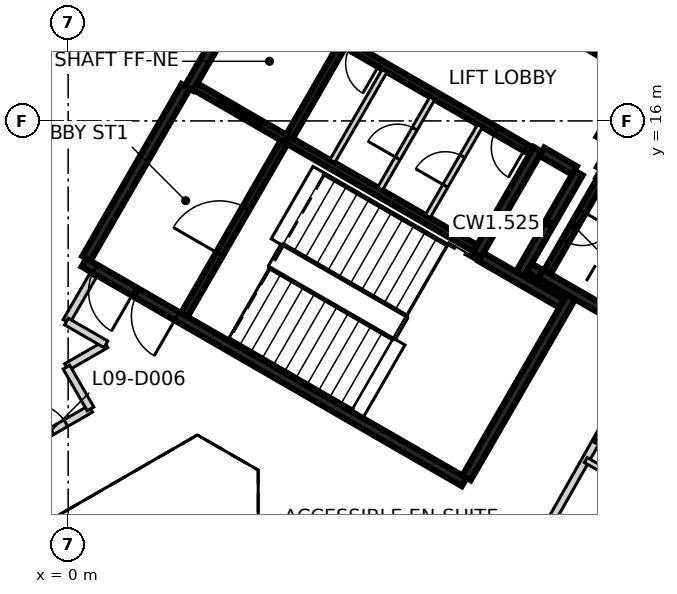
"""IFC4 building model, lengths in metres.
Left out: names, types, materials, properties, quantities, classifications, styles, units other than length and angle.
Written with IfcOpenShell. Run it as: python <this file> out.ifc"""

import sys

from ifc_helpers import new_model, si_unit, direction, frame, frame_2d, origin, place, context, subcontext, project, spatial, rectangle, extrude, element, fill, save


model = new_model("IFC4")
c1 = context("Model", 3, precision=1e-05, world=origin(), true_north=direction((0.0, 1.0)))
c2 = subcontext(c1, "Body", "Model", "MODEL_VIEW")
j1 = project(units=[si_unit("LENGTHUNIT", "METRE"), si_unit("PLANEANGLEUNIT", "RADIAN")], contexts=[c1])
p1 = place(None, origin())
s1 = spatial("IfcSite", under=j1, at=p1, CompositionType="ELEMENT")
p2 = place(p1, origin())
s2 = spatial("IfcBuilding", under=s1, at=p2, CompositionType="ELEMENT")
p3 = place(p2, frame((0.0, 0.0, 45.8)))
s3 = spatial("IfcBuildingStorey", under=s2, at=p3, CompositionType="ELEMENT", Elevation=45.8)
p4 = place(p3, frame((10.42, 6.498, 0.0), z_axis=(0.0, 0.0, 1.0), x_axis=(-0.866021906294, 0.500006057782, 0.0)))
e1 = element("IfcWall", 1, at=p4, inside=s3, PredefinedType="SHEAR", context=c2, shape_type="SweptSolid", body=[
    extrude(rectangle(XDim=11.55, YDim=0.25, at=frame_2d((5.775, 0.0))), origin(), (0.0, 0.0, 1.0), 3.125),
])
p5 = place(p4, frame((10.025, 0.0, 0.0)))
e2 = element("IfcOpeningElement", 2, at=p5, cuts=e1, PredefinedType="OPENING", context=c2, shape_type="SweptSolid", body=[
    extrude(rectangle(XDim=1.2, YDim=2.1, at=frame_2d((0.6, 1.05))), frame((0.0, 0.135, 0.0), z_axis=(0.0, -1.0, 0.0), x_axis=(1.0, 0.0, 0.0)), (0.0, 0.0, 1.0), 0.27),
])
p6 = place(p4, frame((8.725, 0.0, 0.0)))
e3 = element("IfcOpeningElement", 3, at=p6, cuts=e1, PredefinedType="OPENING", context=c2, shape_type="SweptSolid", body=[
    extrude(rectangle(XDim=1.2, YDim=2.1, at=frame_2d((0.6, 1.05))), frame((0.0, 0.135, 0.0), z_axis=(0.0, -1.0, 0.0), x_axis=(1.0, 0.0, 0.0)), (0.0, 0.0, 1.0), 0.27),
])
p7 = place(p3, frame((3.179, 16.856, 0.0), z_axis=(0.0, 0.0, 1.0), x_axis=(0.500004234368, 0.866022959057, 0.0)))
e4 = element("IfcWall", 4, at=p7, inside=s3, PredefinedType="SHEAR", context=c2, shape_type="SweptSolid", body=[
    extrude(rectangle(XDim=6.25, YDim=0.25, at=frame_2d((3.125, 0.0))), origin(), (0.0, 0.0, 1.0), 3.125),
])
p8 = place(p3, frame((0.48, 12.381, 0.0), z_axis=(0.0, 0.0, 1.0), x_axis=(0.49999885962, 0.866026062182, 0.0)))
e5 = element("IfcWall", 5, at=p8, inside=s3, PredefinedType="SHEAR", context=c2, shape_type="SweptSolid", body=[
    extrude(rectangle(XDim=5.225, YDim=0.25, at=frame_2d((2.612, 0.0))), origin(), (0.0, 0.0, 1.0), 3.125),
])
p9 = place(p3, frame((13.238, 11.378, 0.0), z_axis=(0.0, 0.0, 1.0), x_axis=(-0.500008851346, -0.866020293397, 0.0)))
e6 = element("IfcWall", 6, at=p9, inside=s3, PredefinedType="SHEAR", context=c2, shape_type="SweptSolid", body=[
    extrude(rectangle(XDim=5.51, YDim=0.25, at=frame_2d((2.755, 0.0))), origin(), (0.0, 0.0, 1.0), 3.125),
])
p10 = place(p3, frame((12.357, 15.252, 0.0), z_axis=(0.0, 0.0, 1.0), x_axis=(-0.500028443584, -0.866008981251, 0.0)))
e7 = element("IfcWall", 7, at=p10, inside=s3, PredefinedType="SHEAR", context=c2, shape_type="SweptSolid", body=[
    extrude(rectangle(XDim=3.2, YDim=0.25, at=frame_2d((1.6, 0.0))), origin(), (0.0, 0.0, 1.0), 3.125),
])
p11 = place(p3, frame((14.918, 10.54, 0.0), z_axis=(0.0, 0.0, 1.0), x_axis=(-0.866063538972, 0.499933942099, 0.0)))
e8 = element("IfcWall", 8, at=p11, inside=s3, PredefinedType="SHEAR", context=c2, shape_type="SweptSolid", body=[
    extrude(rectangle(XDim=2.865, YDim=0.25, at=frame_2d((1.432, 0.0))), origin(), (0.0, 0.0, 1.0), 3.125),
])
p12 = place(p3, frame((13.963, 14.614, 0.0), z_axis=(0.0, 0.0, 1.0), x_axis=(0.866042235819, -0.499970844928, 0.0)))
e9 = element("IfcWall", 9, at=p12, inside=s3, PredefinedType="SHEAR", context=c2, shape_type="SweptSolid", body=[
    extrude(rectangle(XDim=2.865, YDim=0.25, at=frame_2d((1.432, 0.0))), origin(), (0.0, 0.0, 1.0), 3.125),
])
p13 = place(p3, frame((11.888, 11.961, 0.0), z_axis=(0.0, 0.0, 1.0), x_axis=(0.500003324108, 0.866023484601, 0.0)))
e10 = element("IfcWall", 10, at=p13, inside=s3, PredefinedType="SHEAR", context=c2, shape_type="SweptSolid", body=[
    extrude(rectangle(XDim=3.085, YDim=0.25, at=frame_2d((1.542, 0.0))), origin(), (0.0, 0.0, 1.0), 3.125),
])
p14 = place(p3, frame((10.865, 12.418, 0.0), z_axis=(0.0, 0.0, 1.0), x_axis=(0.866026229868, -0.499998569178, 0.0)))
e11 = element("IfcWall", 11, at=p14, inside=s3, PredefinedType="SHEAR", context=c2, shape_type="SweptSolid", body=[
    extrude(rectangle(XDim=2.449, YDim=0.25, at=frame_2d((1.225, 0.0))), origin(), (0.0, 0.0, 1.0), 3.125),
])
p15 = place(p3, frame((13.297, 18.231, 0.0), z_axis=(0.0, 0.0, 1.0), x_axis=(0.866043531843, -0.499968599967, 0.0)))
e12 = element("IfcWall", 12, at=p15, inside=s3, PredefinedType="SHEAR", context=c2, shape_type="SweptSolid", body=[
    extrude(rectangle(XDim=1.975, YDim=0.25, at=frame_2d((0.987, 0.0))), origin(), (0.0, 0.0, 1.0), 3.125),
])
p16 = place(p3, frame((14.945, 17.135, 0.0), z_axis=(0.0, 0.0, 1.0), x_axis=(-0.499983108224, -0.866035156036, 0.0)))
e13 = element("IfcWall", 13, at=p16, inside=s3, PredefinedType="SHEAR", context=c2, shape_type="SweptSolid", body=[
    extrude(rectangle(XDim=1.865, YDim=0.25, at=frame_2d((0.932, 0.0))), origin(), (0.0, 0.0, 1.0), 3.125),
])
p17 = place(p16, frame((0.535, 0.0, 0.0)))
e14 = element("IfcOpeningElement", 14, at=p17, cuts=e13, PredefinedType="OPENING", context=c2, shape_type="SweptSolid", body=[
    extrude(rectangle(XDim=1.25, YDim=2.1, at=frame_2d((0.625, 1.05))), frame((0.0, 0.135, 0.0), z_axis=(0.0, -1.0, 0.0), x_axis=(1.0, 0.0, 0.0)), (0.0, 0.0, 1.0), 0.27),
])
p18 = place(p3, frame((13.322, 14.695, 0.0), z_axis=(0.0, 0.0, 1.0), x_axis=(-0.866017078145, 0.500014420154, 0.0)))
e15 = element("IfcWall", 15, at=p18, inside=s3, PredefinedType="SHEAR", context=c2, shape_type="SweptSolid", body=[
    extrude(rectangle(XDim=0.989, YDim=0.25, at=frame_2d((0.495, 0.0))), origin(), (0.0, 0.0, 1.0), 3.125),
])
p19 = place(p3, frame((14.368, 15.315, 0.0), z_axis=(0.0, 0.0, 1.0), x_axis=(-0.499897359611, -0.866084655132, 0.0)))
e16 = element("IfcWall", 16, at=p19, inside=s3, PredefinedType="SHEAR", context=c2, shape_type="SweptSolid", body=[
    extrude(rectangle(XDim=0.685, YDim=0.25, at=frame_2d((0.342, 0.0))), origin(), (0.0, 0.0, 1.0), 3.125),
])
p20 = place(p3, frame((12.433, 11.964, 0.0), z_axis=(0.0, 0.0, 1.0), x_axis=(-0.866055875208, 0.499947218231, 0.0)))
e17 = element("IfcWall", 17, at=p20, inside=s3, PredefinedType="SHEAR", context=c2, shape_type="SweptSolid", body=[
    extrude(rectangle(XDim=0.345, YDim=0.25, at=frame_2d((0.172, 0.0))), origin(), (0.0, 0.0, 1.0), 3.125),
])
p21 = place(p3, frame((5.775, 15.502, 0.0), z_axis=(0.0, 0.0, 1.0), x_axis=(0.866020080793, -0.500009219579, 0.0)))
e18 = element("IfcWall", 18, at=p21, inside=s3, PredefinedType="SHEAR", context=c2, shape_type="SweptSolid", body=[
    extrude(rectangle(XDim=5.699, YDim=0.2, at=frame_2d((2.85, 0.0))), origin(), (0.0, 0.0, 1.0), 3.125),
])
p22 = place(p3, frame((12.185, 15.207, 0.0), z_axis=(0.0, 0.0, 1.0), x_axis=(-0.866020080793, 0.500009219579, 0.0)))
e19 = element("IfcWall", 19, at=p22, inside=s3, PredefinedType="SHEAR", context=c2, shape_type="SweptSolid", body=[
    extrude(rectangle(XDim=5.699, YDim=0.2, at=frame_2d((2.85, 0.0))), origin(), (0.0, 0.0, 1.0), 3.125),
])
p23 = place(p22, frame((0.174, 0.0, 0.0)))
e20 = element("IfcOpeningElement", 20, at=p23, cuts=e19, PredefinedType="OPENING", context=c2, shape_type="SweptSolid", body=[
    extrude(rectangle(XDim=0.9, YDim=2.1, at=frame_2d((0.45, 1.05))), frame((0.0, 0.11, 0.0), z_axis=(0.0, -1.0, 0.0), x_axis=(1.0, 0.0, 0.0)), (0.0, 0.0, 1.0), 0.22),
])
p24 = place(p22, frame((4.599, 0.0, 0.0)))
e21 = element("IfcOpeningElement", 21, at=p24, cuts=e19, PredefinedType="OPENING", context=c2, shape_type="SweptSolid", body=[
    extrude(rectangle(XDim=0.9, YDim=2.1, at=frame_2d((0.45, 1.05))), frame((0.0, 0.11, 0.0), z_axis=(0.0, -1.0, 0.0), x_axis=(1.0, 0.0, 0.0)), (0.0, 0.0, 1.0), 0.22),
])
p25 = place(p3, frame((3.057, 10.895, 0.0), z_axis=(0.0, 0.0, 1.0), x_axis=(0.499989418164, 0.866031513124, 0.0)))
e22 = element("IfcWall", 22, at=p25, inside=s3, PredefinedType="SHEAR", context=c2, shape_type="SweptSolid", body=[
    extrude(rectangle(XDim=5.251, YDim=0.2, at=frame_2d((2.625, 0.0))), origin(), (0.0, 0.0, 1.0), 3.125),
])
p26 = place(p25, frame((1.849, 0.0, 0.0)))
e23 = element("IfcOpeningElement", 23, at=p26, cuts=e22, PredefinedType="OPENING", context=c2, shape_type="SweptSolid", body=[
    extrude(rectangle(XDim=1.4, YDim=2.1, at=frame_2d((0.7, 1.05))), frame((0.0, 0.11, 0.0), z_axis=(0.0, -1.0, 0.0), x_axis=(1.0, 0.0, 0.0)), (0.0, 0.0, 1.0), 0.22),
])
p27 = place(p3, frame((14.008, 14.442, 0.0), z_axis=(0.0, 0.0, 1.0), x_axis=(-0.499986818241, -0.866033014143, 0.0)))
e24 = element("IfcWall", 24, at=p27, inside=s3, PredefinedType="SHEAR", context=c2, shape_type="SweptSolid", body=[
    extrude(rectangle(XDim=2.798, YDim=0.2, at=frame_2d((1.399, 0.0))), origin(), (0.0, 0.0, 1.0), 3.125),
])
p28 = place(p27, frame((0.949, 0.0, 0.0)))
e25 = element("IfcOpeningElement", 25, at=p28, cuts=e24, PredefinedType="OPENING", context=c2, shape_type="SweptSolid", body=[
    extrude(rectangle(XDim=0.9, YDim=2.1, at=frame_2d((0.45, 1.05))), frame((0.0, 0.11, 0.0), z_axis=(0.0, -1.0, 0.0), x_axis=(1.0, 0.0, 0.0)), (0.0, 0.0, 1.0), 0.22),
])
p29 = place(p3, frame((7.199, 17.97, 0.0), z_axis=(0.0, 0.0, 1.0), x_axis=(-0.499968400327, -0.866043647095, 0.0)))
e26 = element("IfcWall", 26, at=p29, inside=s3, PredefinedType="SHEAR", context=c2, shape_type="SweptSolid", body=[
    extrude(rectangle(XDim=2.75, YDim=0.2, at=frame_2d((1.375, 0.0))), origin(), (0.0, 0.0, 1.0), 3.125),
])
p30 = place(p3, frame((5.725, 15.531, 0.0), z_axis=(0.0, 0.0, 1.0), x_axis=(-0.866037306777, 0.499979382845, 0.0)))
e27 = element("IfcWall", 27, at=p30, inside=s3, PredefinedType="SHEAR", context=c2, shape_type="SweptSolid", body=[
    extrude(rectangle(XDim=2.742, YDim=0.2, at=frame_2d((1.371, 0.0))), origin(), (0.0, 0.0, 1.0), 3.125),
])
p31 = place(p30, frame((0.743, 0.0, 0.0)))
e28 = element("IfcOpeningElement", 28, at=p31, cuts=e27, PredefinedType="OPENING", context=c2, shape_type="SweptSolid", body=[
    extrude(rectangle(XDim=1.3, YDim=2.1, at=frame_2d((0.65, 1.05))), frame((0.0, 0.11, 0.0), z_axis=(0.0, -1.0, 0.0), x_axis=(1.0, 0.0, 0.0)), (0.0, 0.0, 1.0), 0.22),
])
p32 = place(p3, frame((9.462, 13.489, 0.0), z_axis=(0.0, 0.0, 1.0), x_axis=(0.50002746344, 0.86600954718, 0.0)))
e29 = element("IfcWall", 29, at=p32, inside=s3, PredefinedType="PARTITIONING", context=c2, shape_type="SweptSolid", body=[
    extrude(rectangle(XDim=2.748, YDim=0.15, at=frame_2d((1.374, 0.0))), origin(), (0.0, 0.0, 1.0), 3.125),
])
p33 = place(p32, frame((0.924, 0.0, 0.0)))
e30 = element("IfcOpeningElement", 30, at=p33, cuts=e29, PredefinedType="OPENING", context=c2, shape_type="SweptSolid", body=[
    extrude(rectangle(XDim=0.9, YDim=2.1, at=frame_2d((0.45, 1.05))), frame((0.0, 0.085, 0.0), z_axis=(0.0, -1.0, 0.0), x_axis=(1.0, 0.0, 0.0)), (0.0, 0.0, 1.0), 0.17),
])
p34 = place(p3, frame((8.207, 14.214, 0.0), z_axis=(0.0, 0.0, 1.0), x_axis=(0.499922376475, 0.866070215109, 0.0)))
e31 = element("IfcWall", 31, at=p34, inside=s3, PredefinedType="PARTITIONING", context=c2, shape_type="SweptSolid", body=[
    extrude(rectangle(XDim=2.749, YDim=0.15, at=frame_2d((1.374, 0.0))), origin(), (0.0, 0.0, 1.0), 3.125),
])
p35 = place(p34, frame((0.924, 0.0, 0.0)))
e32 = element("IfcOpeningElement", 32, at=p35, cuts=e31, PredefinedType="OPENING", context=c2, shape_type="SweptSolid", body=[
    extrude(rectangle(XDim=0.9, YDim=2.1, at=frame_2d((0.45, 1.05))), frame((0.0, 0.085, 0.0), z_axis=(0.0, -1.0, 0.0), x_axis=(1.0, 0.0, 0.0)), (0.0, 0.0, 1.0), 0.17),
])
p36 = place(p3, frame((6.951, 14.939, 0.0), z_axis=(0.0, 0.0, 1.0), x_axis=(0.50002746344, 0.86600954718, 0.0)))
e33 = element("IfcWall", 33, at=p36, inside=s3, PredefinedType="PARTITIONING", context=c2, shape_type="SweptSolid", body=[
    extrude(rectangle(XDim=2.748, YDim=0.15, at=frame_2d((1.374, 0.0))), origin(), (0.0, 0.0, 1.0), 3.125),
])
p37 = place(p3, frame((-5.446, 4.94, 0.0), z_axis=(0.0, 0.0, 1.0), x_axis=(0.866096332545, 0.499877127655, 0.0)))
e34 = element("IfcWall", 34, at=p37, inside=s3, PredefinedType="PARTITIONING", context=c2, shape_type="SweptSolid", body=[
    extrude(rectangle(XDim=6.969, YDim=0.2, at=frame_2d((3.484, 0.0))), origin(), (0.0, 0.0, 1.0), 3.125),
])
p38 = place(p37, frame((5.219, 0.0, 0.0)))
e35 = element("IfcOpeningElement", 35, at=p38, cuts=e34, PredefinedType="OPENING", context=c2, shape_type="SweptSolid", body=[
    extrude(rectangle(XDim=1.0, YDim=2.1, at=frame_2d((0.5, 1.05))), frame((0.0, 0.11, 0.0), z_axis=(0.0, -1.0, 0.0), x_axis=(1.0, 0.0, 0.0)), (0.0, 0.0, 1.0), 0.22),
])
p39 = place(p37, frame((3.344, 0.0, 0.0)))
e36 = element("IfcOpeningElement", 36, at=p39, cuts=e34, PredefinedType="OPENING", context=c2, shape_type="SweptSolid", body=[
    extrude(rectangle(XDim=0.95, YDim=2.1, at=frame_2d((0.475, 1.05))), frame((0.0, 0.11, 0.0), z_axis=(0.0, -1.0, 0.0), x_axis=(1.0, 0.0, 0.0)), (0.0, 0.0, 1.0), 0.22),
])
p40 = place(p3, frame((-0.045, 9.522, 0.0), z_axis=(0.0, 0.0, 1.0), x_axis=(0.86625675314, 0.499599076899, 0.0)))
e37 = element("IfcWall", 37, at=p40, inside=s3, PredefinedType="PARTITIONING", context=c2, shape_type="SweptSolid", body=[
    extrude(rectangle(XDim=1.199, YDim=0.2, at=frame_2d((0.6, 0.0))), origin(), (0.0, 0.0, 1.0), 3.125),
])
p41 = place(p3, frame((-0.045, 10.722, 0.0), z_axis=(0.0, 0.0, 1.0), x_axis=(0.500107785535, 0.865963164833, 0.0)))
e38 = element("IfcWall", 38, at=p41, inside=s3, PredefinedType="PARTITIONING", context=c2, shape_type="SweptSolid", body=[
    extrude(rectangle(XDim=1.389, YDim=0.2, at=frame_2d((0.695, 0.0))), origin(), (0.0, 0.0, 1.0), 3.125),
])
p42 = place(p3, frame((-0.045, 9.521, 0.0), z_axis=(0.0, 0.0, 1.0), x_axis=(0.500094716449, -0.865970712311, 0.0)))
e39 = element("IfcWall", 39, at=p42, inside=s3, PredefinedType="PARTITIONING", context=c2, shape_type="SweptSolid", body=[
    extrude(rectangle(XDim=1.268, YDim=0.2, at=frame_2d((0.634, 0.0))), origin(), (0.0, 0.0, 1.0), 3.125),
])
p43 = place(p3, frame((-0.045, 10.721, 0.0), z_axis=(0.0, 0.0, 1.0), x_axis=(0.865992388649, -0.500057179532, 0.0)))
e40 = element("IfcWall", 40, at=p43, inside=s3, PredefinedType="PARTITIONING", context=c2, shape_type="SweptSolid", body=[
    extrude(rectangle(XDim=1.199, YDim=0.2, at=frame_2d((0.6, 0.0))), origin(), (0.0, 0.0, 1.0), 3.125),
])
p44 = place(p3, frame((12.432, 4.992, 0.0), z_axis=(0.0, 0.0, 1.0), x_axis=(0.492790102015, 0.870148214591, 0.0)))
e41 = element("IfcWall", 41, at=p44, inside=s3, PredefinedType="PARTITIONING", context=c2, shape_type="SweptSolid", body=[
    extrude(rectangle(XDim=5.981, YDim=0.2, at=frame_2d((2.991, 0.0))), origin(), (0.0, 0.0, 1.0), 3.125),
])
p45 = place(p3, frame((13.619, 7.076, 0.0), z_axis=(0.0, 0.0, 1.0), x_axis=(0.870725399165, -0.491769538758, 0.0)))
e42 = element("IfcWall", 42, at=p45, inside=s3, PredefinedType="PARTITIONING", context=c2, shape_type="SweptSolid", body=[
    extrude(rectangle(XDim=2.489, YDim=0.15, at=frame_2d((1.244, 0.0))), origin(), (0.0, 0.0, 1.0), 3.125),
])
p46 = place(p45, frame((0.845, 0.0, 0.0)))
e43 = element("IfcOpeningElement", 43, at=p46, cuts=e42, PredefinedType="OPENING", context=c2, shape_type="SweptSolid", body=[
    extrude(rectangle(XDim=0.8, YDim=2.1, at=frame_2d((0.4, 1.05))), frame((0.0, 0.085, 0.0), z_axis=(0.0, -1.0, 0.0), x_axis=(1.0, 0.0, 0.0)), (0.0, 0.0, 1.0), 0.17),
])
p47 = place(p31, origin())
e44 = element("IfcDoor", 44, at=p47, inside=s3, OperationType="SLIDING_TO_RIGHT", PredefinedType="DOOR", context=c2, shape_type="SweptSolid", body=[
    extrude(rectangle(XDim=1.3, YDim=2.1, at=frame_2d((0.65, 1.05))), frame((0.0, 0.025, 0.0), z_axis=(0.0, -1.0, 0.0), x_axis=(1.0, 0.0, 0.0)), (0.0, 0.0, 1.0), 0.05),
])
fill(e28, e44)
p48 = place(p5, origin())
e45 = element("IfcDoor", 45, at=p48, inside=s3, OperationType="SINGLE_SWING_LEFT", PredefinedType="DOOR", context=c2, shape_type="SweptSolid", body=[
    extrude(rectangle(XDim=1.2, YDim=2.1, at=frame_2d((0.6, 1.05))), frame((0.0, 0.025, 0.0), z_axis=(0.0, -1.0, 0.0), x_axis=(1.0, 0.0, 0.0)), (0.0, 0.0, 1.0), 0.05),
])
fill(e2, e45)
p49 = place(p6, origin())
e46 = element("IfcDoor", 46, at=p49, inside=s3, OperationType="SINGLE_SWING_RIGHT", PredefinedType="DOOR", context=c2, shape_type="SweptSolid", body=[
    extrude(rectangle(XDim=1.2, YDim=2.1, at=frame_2d((0.6, 1.05))), frame((0.0, 0.025, 0.0), z_axis=(0.0, -1.0, 0.0), x_axis=(1.0, 0.0, 0.0)), (0.0, 0.0, 1.0), 0.05),
])
fill(e3, e46)
p50 = place(p26, origin())
e47 = element("IfcDoor", 47, at=p50, inside=s3, OperationType="SINGLE_SWING_RIGHT", PredefinedType="DOOR", context=c2, shape_type="SweptSolid", body=[
    extrude(rectangle(XDim=1.4, YDim=2.1, at=frame_2d((0.7, 1.05))), frame((0.0, 0.025, 0.0), z_axis=(0.0, -1.0, 0.0), x_axis=(1.0, 0.0, 0.0)), (0.0, 0.0, 1.0), 0.05),
])
fill(e23, e47)
p51 = place(p23, origin())
e48 = element("IfcDoor", 48, at=p51, inside=s3, OperationType="SINGLE_SWING_LEFT", PredefinedType="DOOR", context=c2, shape_type="SweptSolid", body=[
    extrude(rectangle(XDim=0.9, YDim=2.1, at=frame_2d((0.45, 1.05))), frame((0.0, 0.025, 0.0), z_axis=(0.0, -1.0, 0.0), x_axis=(1.0, 0.0, 0.0)), (0.0, 0.0, 1.0), 0.05),
])
fill(e20, e48)
p52 = place(p33, origin())
e49 = element("IfcDoor", 49, at=p52, inside=s3, OperationType="SINGLE_SWING_RIGHT", PredefinedType="DOOR", context=c2, shape_type="SweptSolid", body=[
    extrude(rectangle(XDim=0.9, YDim=2.1, at=frame_2d((0.45, 1.05))), frame((0.0, 0.025, 0.0), z_axis=(0.0, -1.0, 0.0), x_axis=(1.0, 0.0, 0.0)), (0.0, 0.0, 1.0), 0.05),
])
fill(e30, e49)
p53 = place(p35, origin())
e50 = element("IfcDoor", 50, at=p53, inside=s3, OperationType="SINGLE_SWING_LEFT", PredefinedType="DOOR", context=c2, shape_type="SweptSolid", body=[
    extrude(rectangle(XDim=0.9, YDim=2.1, at=frame_2d((0.45, 1.05))), frame((0.0, 0.025, 0.0), z_axis=(0.0, -1.0, 0.0), x_axis=(1.0, 0.0, 0.0)), (0.0, 0.0, 1.0), 0.05),
])
fill(e32, e50)
p54 = place(p24, origin())
e51 = element("IfcDoor", 51, at=p54, inside=s3, OperationType="SINGLE_SWING_RIGHT", PredefinedType="DOOR", context=c2, shape_type="SweptSolid", body=[
    extrude(rectangle(XDim=0.9, YDim=2.1, at=frame_2d((0.45, 1.05))), frame((0.0, 0.025, 0.0), z_axis=(0.0, -1.0, 0.0), x_axis=(1.0, 0.0, 0.0)), (0.0, 0.0, 1.0), 0.05),
])
fill(e21, e51)
p55 = place(p28, origin())
e52 = element("IfcDoor", 52, at=p55, inside=s3, OperationType="SINGLE_SWING_LEFT", PredefinedType="DOOR", context=c2, shape_type="SweptSolid", body=[
    extrude(rectangle(XDim=0.9, YDim=2.1, at=frame_2d((0.45, 1.05))), frame((0.0, 0.025, 0.0), z_axis=(0.0, -1.0, 0.0), x_axis=(1.0, 0.0, 0.0)), (0.0, 0.0, 1.0), 0.05),
])
fill(e25, e52)
p56 = place(p38, origin())
e53 = element("IfcDoor", 53, at=p56, inside=s3, OperationType="SINGLE_SWING_LEFT", PredefinedType="DOOR", context=c2, shape_type="SweptSolid", body=[
    extrude(rectangle(XDim=1.0, YDim=2.1, at=frame_2d((0.5, 1.05))), frame((0.0, 0.025, 0.0), z_axis=(0.0, -1.0, 0.0), x_axis=(1.0, 0.0, 0.0)), (0.0, 0.0, 1.0), 0.05),
])
fill(e35, e53)
save(model, sys.argv[1])
